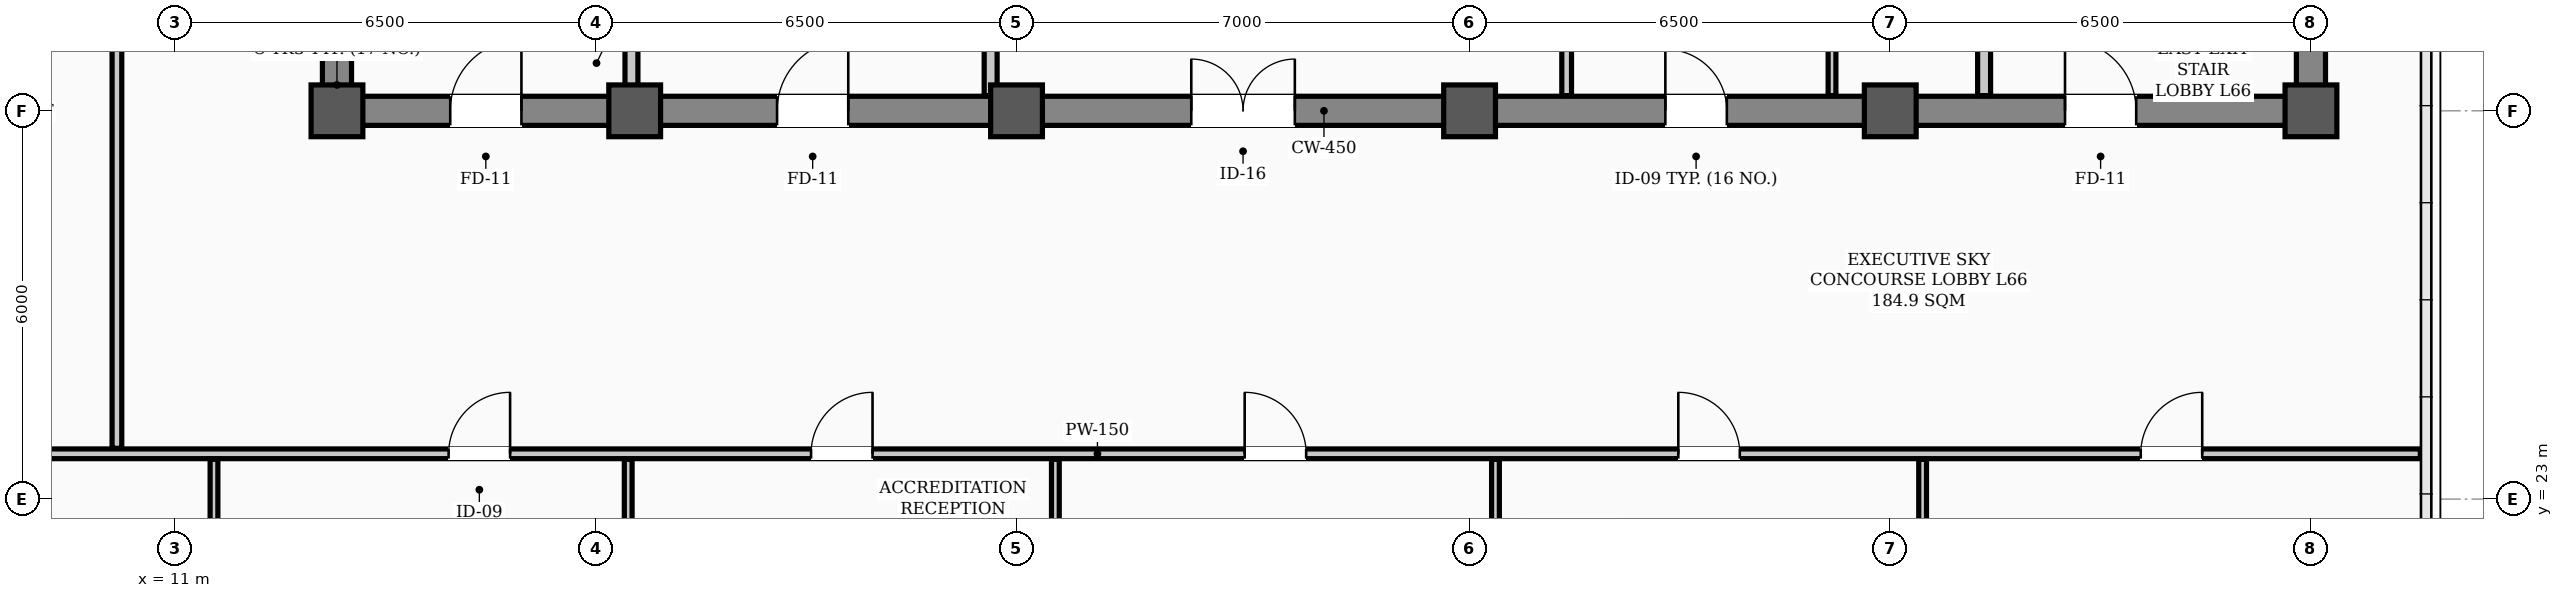
"""IFC4 building model, lengths in metres.
Left out: names, types, materials, properties, quantities, classifications, styles, units other than length and angle.
Written with IfcOpenShell. Run it as: python <this file> out.ifc"""

import sys

from ifc_helpers import new_model, si_unit, direction, frame, frame_2d, origin, origin_2d, place, context, subcontext, project, spatial, rectangle, hollow_rectangle, extrude, element, fill, save


model = new_model("IFC4")
c1 = context("Model", 3, precision=1e-05, world=origin(), true_north=direction((0.0, 1.0)))
c2 = subcontext(c1, "Body", "Model", "MODEL_VIEW")
j1 = project(units=[si_unit("LENGTHUNIT", "METRE"), si_unit("PLANEANGLEUNIT", "RADIAN")], contexts=[c1])
p1 = place(None, origin())
s1 = spatial("IfcSite", under=j1, at=p1, CompositionType="ELEMENT")
p2 = place(p1, origin())
s2 = spatial("IfcBuilding", under=s1, at=p2, CompositionType="ELEMENT")
p3 = place(p2, frame((0.0, 0.0, 265.7)))
s3 = spatial("IfcBuildingStorey", under=s2, at=p3, CompositionType="ELEMENT", Elevation=265.7)
for number, where, z_axis, x_axis in (
    (1, (13.5, 29.0, 0.0), (0.0, 0.0, 1.0), (1.0, 0.0, 0.0)),
    (2, (18.1, 29.0, 0.0), (0.0, 0.0, 1.0), (1.0, 0.0, 0.0)),
    (3, (24.0, 29.0, 0.0), (0.0, 0.0, 1.0), (1.0, 0.0, 0.0)),
    (4, (31.0, 29.0, 0.0), (0.0, 0.0, 1.0), (1.0, 0.0, 0.0)),
    (5, (37.5, 29.0, 0.0), (0.0, 0.0, 1.0), (1.0, 0.0, 0.0)),
    (6, (44.0, 29.0, 0.0), (0.0, 0.0, 1.0), (1.0, 0.0, 0.0)),
):
    element("IfcColumn", number, at=place(p3, frame(where, z_axis=z_axis, x_axis=x_axis)), inside=s3, PredefinedType="COLUMN", context=c2, shape_type="SweptSolid", body=[
        extrude(hollow_rectangle(XDim=0.8, YDim=0.8, WallThickness=0.032, InnerFilletRadius=0.016, OuterFilletRadius=0.048, at=origin_2d()), origin(), (0.0, 0.0, 1.0), 3.9),
    ])
p4 = place(p3, frame((13.5, 29.0, 0.0), z_axis=(0.0, 0.0, 1.0), x_axis=(1.0, 0.0, 0.0)))
e7 = element("IfcWall", 7, at=p4, inside=s3, PredefinedType="SHEAR", context=c2, shape_type="SweptSolid", body=[
    extrude(rectangle(XDim=30.5, YDim=0.45, at=frame_2d((15.25, 0.0))), origin(), (0.0, 0.0, 1.0), 3.72),
])
p5 = place(p4, frame((1.75, 0.0, 0.0)))
e8 = element("IfcOpeningElement", 8, at=p5, cuts=e7, PredefinedType="OPENING", context=c2, shape_type="SweptSolid", body=[
    extrude(rectangle(XDim=1.1, YDim=2.08, at=frame_2d((0.55, 1.04))), frame((0.0, 0.235, 0.0), z_axis=(0.0, -1.0, 0.0), x_axis=(1.0, 0.0, 0.0)), (0.0, 0.0, 1.0), 0.47),
])
p6 = place(p4, frame((26.7, 0.0, 0.0)))
e9 = element("IfcOpeningElement", 9, at=p6, cuts=e7, PredefinedType="OPENING", context=c2, shape_type="SweptSolid", body=[
    extrude(rectangle(XDim=1.1, YDim=2.08, at=frame_2d((0.55, 1.04))), frame((0.0, 0.235, 0.0), z_axis=(0.0, -1.0, 0.0), x_axis=(1.0, 0.0, 0.0)), (0.0, 0.0, 1.0), 0.47),
])
p7 = place(p4, frame((6.8, 0.0, 0.0)))
e10 = element("IfcOpeningElement", 10, at=p7, cuts=e7, PredefinedType="OPENING", context=c2, shape_type="SweptSolid", body=[
    extrude(rectangle(XDim=1.1, YDim=2.08, at=frame_2d((0.55, 1.04))), frame((0.0, 0.235, 0.0), z_axis=(0.0, -1.0, 0.0), x_axis=(1.0, 0.0, 0.0)), (0.0, 0.0, 1.0), 0.47),
])
p8 = place(p4, frame((13.2, 0.0, 0.0)))
e11 = element("IfcOpeningElement", 11, at=p8, cuts=e7, PredefinedType="OPENING", context=c2, shape_type="SweptSolid", body=[
    extrude(rectangle(XDim=1.6, YDim=2.08, at=frame_2d((0.8, 1.04))), frame((0.0, 0.235, 0.0), z_axis=(0.0, -1.0, 0.0), x_axis=(1.0, 0.0, 0.0)), (0.0, 0.0, 1.0), 0.47),
])
p9 = place(p4, frame((20.525, 0.0, 0.0)))
e12 = element("IfcOpeningElement", 12, at=p9, cuts=e7, PredefinedType="OPENING", context=c2, shape_type="SweptSolid", body=[
    extrude(rectangle(XDim=0.95, YDim=2.08, at=frame_2d((0.475, 1.04))), frame((0.0, 0.235, 0.0), z_axis=(0.0, -1.0, 0.0), x_axis=(1.0, 0.0, 0.0)), (0.0, 0.0, 1.0), 0.47),
])
for number, where, z_axis, x_axis in (
    (13, (13.5, 29.35, 0.0), (0.0, 0.0, 1.0), (0.0, 1.0, 0.0)),
    (14, (44.0, 29.35, 0.0), (0.0, 0.0, 1.0), (0.0, 1.0, 0.0)),
):
    element("IfcWall", number, at=place(p3, frame(where, z_axis=z_axis, x_axis=x_axis)), inside=s3, PredefinedType="SHEAR", context=c2, shape_type="SweptSolid", body=[
        extrude(rectangle(XDim=8.6, YDim=0.45, at=frame_2d((4.3, 0.0))), origin(), (0.0, 0.0, 1.0), 3.72),
    ])
p10 = place(p3, frame((4.81, 23.7, 0.0), z_axis=(0.0, 0.0, 1.0), x_axis=(1.0, 0.0, 0.0)))
e15 = element("IfcWall", 15, at=p10, inside=s3, PredefinedType="PARTITIONING", context=c2, shape_type="SweptSolid", body=[
    extrude(rectangle(XDim=40.88, YDim=0.15, at=frame_2d((20.44, 0.0))), origin(), (0.0, 0.0, 1.0), 3.2),
])
p11 = place(p10, frame((10.415, 0.0, 0.0)))
e16 = element("IfcOpeningElement", 16, at=p11, cuts=e15, PredefinedType="OPENING", context=c2, shape_type="SweptSolid", body=[
    extrude(rectangle(XDim=0.95, YDim=2.08, at=frame_2d((0.475, 1.04))), frame((0.0, 0.085, 0.0), z_axis=(0.0, -1.0, 0.0), x_axis=(1.0, 0.0, 0.0)), (0.0, 0.0, 1.0), 0.17),
])
p12 = place(p10, frame((16.015, 0.0, 0.0)))
e17 = element("IfcOpeningElement", 17, at=p12, cuts=e15, PredefinedType="OPENING", context=c2, shape_type="SweptSolid", body=[
    extrude(rectangle(XDim=0.95, YDim=2.08, at=frame_2d((0.475, 1.04))), frame((0.0, 0.085, 0.0), z_axis=(0.0, -1.0, 0.0), x_axis=(1.0, 0.0, 0.0)), (0.0, 0.0, 1.0), 0.17),
])
p13 = place(p10, frame((22.715, 0.0, 0.0)))
e18 = element("IfcOpeningElement", 18, at=p13, cuts=e15, PredefinedType="OPENING", context=c2, shape_type="SweptSolid", body=[
    extrude(rectangle(XDim=0.95, YDim=2.08, at=frame_2d((0.475, 1.04))), frame((0.0, 0.085, 0.0), z_axis=(0.0, -1.0, 0.0), x_axis=(1.0, 0.0, 0.0)), (0.0, 0.0, 1.0), 0.17),
])
p14 = place(p10, frame((29.415, 0.0, 0.0)))
e19 = element("IfcOpeningElement", 19, at=p14, cuts=e15, PredefinedType="OPENING", context=c2, shape_type="SweptSolid", body=[
    extrude(rectangle(XDim=0.95, YDim=2.08, at=frame_2d((0.475, 1.04))), frame((0.0, 0.085, 0.0), z_axis=(0.0, -1.0, 0.0), x_axis=(1.0, 0.0, 0.0)), (0.0, 0.0, 1.0), 0.17),
])
p15 = place(p10, frame((36.56, 0.0, 0.0)))
e20 = element("IfcOpeningElement", 20, at=p15, cuts=e15, PredefinedType="OPENING", context=c2, shape_type="SweptSolid", body=[
    extrude(rectangle(XDim=0.95, YDim=2.08, at=frame_2d((0.475, 1.04))), frame((0.0, 0.085, 0.0), z_axis=(0.0, -1.0, 0.0), x_axis=(1.0, 0.0, 0.0)), (0.0, 0.0, 1.0), 0.17),
])
p16 = place(p3, frame((18.05, 29.235, 0.0), z_axis=(0.0, 0.0, 1.0), x_axis=(0.0, 1.0, 0.0)))
e21 = element("IfcWall", 21, at=p16, inside=s3, PredefinedType="STANDARD", context=c2, shape_type="SweptSolid", body=[
    extrude(rectangle(XDim=1.065, YDim=0.2, at=frame_2d((0.532, 0.0))), origin(), (0.0, 0.0, 1.0), 3.4),
])
p17 = place(p3, frame((38.95, 29.235, 0.0), z_axis=(0.0, 0.0, 1.0), x_axis=(0.0, 1.0, 0.0)))
e22 = element("IfcWall", 22, at=p17, inside=s3, PredefinedType="STANDARD", context=c2, shape_type="SweptSolid", body=[
    extrude(rectangle(XDim=1.065, YDim=0.2, at=frame_2d((0.532, 0.0))), origin(), (0.0, 0.0, 1.0), 3.72),
])
p18 = place(p3, frame((23.6, 29.235, 0.0), z_axis=(0.0, 0.0, 1.0), x_axis=(0.0, 1.0, 0.0)))
e23 = element("IfcWall", 23, at=p18, inside=s3, PredefinedType="STANDARD", context=c2, shape_type="SweptSolid", body=[
    extrude(rectangle(XDim=5.465, YDim=0.2, at=frame_2d((2.732, 0.0))), origin(), (0.0, 0.0, 1.0), 3.2),
])
p19 = place(p3, frame((32.5, 29.235, 0.0), z_axis=(0.0, 0.0, 1.0), x_axis=(0.0, 1.0, 0.0)))
e24 = element("IfcWall", 24, at=p19, inside=s3, PredefinedType="PARTITIONING", context=c2, shape_type="SweptSolid", body=[
    extrude(rectangle(XDim=2.53, YDim=0.15, at=frame_2d((1.265, 0.0))), origin(), (0.0, 0.0, 1.0), 3.4),
])
p20 = place(p3, frame((36.6, 29.235, 0.0), z_axis=(0.0, 0.0, 1.0), x_axis=(0.0, 1.0, 0.0)))
e25 = element("IfcWall", 25, at=p20, inside=s3, PredefinedType="PARTITIONING", context=c2, shape_type="SweptSolid", body=[
    extrude(rectangle(XDim=2.53, YDim=0.12, at=frame_2d((1.265, 0.0))), origin(), (0.0, 0.0, 1.0), 3.4),
])
p21 = place(p3, frame((10.1, 23.785, 0.0), z_axis=(0.0, 0.0, 1.0), x_axis=(0.0, 1.0, 0.0)))
e26 = element("IfcWall", 26, at=p21, inside=s3, PredefinedType="PARTITIONING", context=c2, shape_type="SweptSolid", body=[
    extrude(rectangle(XDim=17.88, YDim=0.15, at=frame_2d((8.94, 0.0))), origin(), (0.0, 0.0, 1.0), 3.1),
])
p22 = place(p21, frame((8.465, 0.0, 0.0)))
e27 = element("IfcOpeningElement", 27, at=p22, cuts=e26, PredefinedType="OPENING", context=c2, shape_type="SweptSolid", body=[
    extrude(rectangle(XDim=0.95, YDim=2.08, at=frame_2d((0.475, 1.04))), frame((0.0, 0.085, 0.0), z_axis=(0.0, -1.0, 0.0), x_axis=(1.0, 0.0, 0.0)), (0.0, 0.0, 1.0), 0.17),
])
p23 = place(p3, frame((11.6, 17.91, 0.0), z_axis=(0.0, 0.0, 1.0), x_axis=(0.0, 1.0, 0.0)))
e28 = element("IfcWall", 28, at=p23, inside=s3, PredefinedType="PARTITIONING", context=c2, shape_type="SweptSolid", body=[
    extrude(rectangle(XDim=5.705, YDim=0.12, at=frame_2d((2.853, 0.0))), origin(), (0.0, 0.0, 1.0), 3.72),
])
p24 = place(p23, frame((3.815, 0.0, 0.0)))
e29 = element("IfcOpeningElement", 29, at=p24, cuts=e28, PredefinedType="OPENING", context=c2, shape_type="SweptSolid", body=[
    extrude(rectangle(XDim=0.95, YDim=2.08, at=frame_2d((0.475, 1.04))), frame((0.0, 0.07, 0.0), z_axis=(0.0, -1.0, 0.0), x_axis=(1.0, 0.0, 0.0)), (0.0, 0.0, 1.0), 0.14),
])
p25 = place(p3, frame((18.0, 17.91, 0.0), z_axis=(0.0, 0.0, 1.0), x_axis=(0.0, 1.0, 0.0)))
e30 = element("IfcWall", 30, at=p25, inside=s3, PredefinedType="PARTITIONING", context=c2, shape_type="SweptSolid", body=[
    extrude(rectangle(XDim=5.705, YDim=0.12, at=frame_2d((2.853, 0.0))), origin(), (0.0, 0.0, 1.0), 3.1),
])
p26 = place(p3, frame((24.6, 19.67, 0.0), z_axis=(0.0, 0.0, 1.0), x_axis=(0.0, 1.0, 0.0)))
e31 = element("IfcWall", 31, at=p26, inside=s3, PredefinedType="PARTITIONING", context=c2, shape_type="SweptSolid", body=[
    extrude(rectangle(XDim=3.945, YDim=0.12, at=frame_2d((1.973, 0.0))), origin(), (0.0, 0.0, 1.0), 3.1),
])
for number, where, z_axis, x_axis in (
    (32, (31.4, 17.91, 0.0), (0.0, 0.0, 1.0), (0.0, 1.0, 0.0)),
    (33, (38.0, 17.91, 0.0), (0.0, 0.0, 1.0), (0.0, 1.0, 0.0)),
):
    element("IfcWall", number, at=place(p3, frame(where, z_axis=z_axis, x_axis=x_axis)), inside=s3, PredefinedType="PARTITIONING", context=c2, shape_type="SweptSolid", body=[
        extrude(rectangle(XDim=5.705, YDim=0.12, at=frame_2d((2.853, 0.0))), origin(), (0.0, 0.0, 1.0), 3.1),
    ])
p27 = place(p5, origin())
e34 = element("IfcDoor", 34, at=p27, inside=s3, OperationType="SINGLE_SWING_RIGHT", PredefinedType="DOOR", context=c2, shape_type="SweptSolid", body=[
    extrude(rectangle(XDim=1.1, YDim=2.08, at=frame_2d((0.55, 1.04))), frame((0.0, 0.025, 0.0), z_axis=(0.0, -1.0, 0.0), x_axis=(1.0, 0.0, 0.0)), (0.0, 0.0, 1.0), 0.05),
])
fill(e8, e34)
p28 = place(p6, origin())
e35 = element("IfcDoor", 35, at=p28, inside=s3, OperationType="SINGLE_SWING_LEFT", PredefinedType="DOOR", context=c2, shape_type="SweptSolid", body=[
    extrude(rectangle(XDim=1.1, YDim=2.08, at=frame_2d((0.55, 1.04))), frame((0.0, 0.025, 0.0), z_axis=(0.0, -1.0, 0.0), x_axis=(1.0, 0.0, 0.0)), (0.0, 0.0, 1.0), 0.05),
])
fill(e9, e35)
p29 = place(p7, origin())
e36 = element("IfcDoor", 36, at=p29, inside=s3, OperationType="SINGLE_SWING_RIGHT", PredefinedType="DOOR", context=c2, shape_type="SweptSolid", body=[
    extrude(rectangle(XDim=1.1, YDim=2.08, at=frame_2d((0.55, 1.04))), frame((0.0, 0.025, 0.0), z_axis=(0.0, -1.0, 0.0), x_axis=(1.0, 0.0, 0.0)), (0.0, 0.0, 1.0), 0.05),
])
fill(e10, e36)
p30 = place(p8, origin())
e37 = element("IfcDoor", 37, at=p30, inside=s3, OperationType="DOUBLE_DOOR_SINGLE_SWING", PredefinedType="DOOR", context=c2, shape_type="SweptSolid", body=[
    extrude(rectangle(XDim=1.6, YDim=2.08, at=frame_2d((0.8, 1.04))), frame((0.0, 0.025, 0.0), z_axis=(0.0, -1.0, 0.0), x_axis=(1.0, 0.0, 0.0)), (0.0, 0.0, 1.0), 0.05),
])
fill(e11, e37)
p31 = place(p9, origin())
e38 = element("IfcDoor", 38, at=p31, inside=s3, OperationType="SINGLE_SWING_LEFT", PredefinedType="DOOR", context=c2, shape_type="SweptSolid", body=[
    extrude(rectangle(XDim=0.95, YDim=2.08, at=frame_2d((0.475, 1.04))), frame((0.0, 0.025, 0.0), z_axis=(0.0, -1.0, 0.0), x_axis=(1.0, 0.0, 0.0)), (0.0, 0.0, 1.0), 0.05),
])
fill(e12, e38)
p32 = place(p11, origin())
e39 = element("IfcDoor", 39, at=p32, inside=s3, OperationType="SINGLE_SWING_RIGHT", PredefinedType="DOOR", context=c2, shape_type="SweptSolid", body=[
    extrude(rectangle(XDim=0.95, YDim=2.08, at=frame_2d((0.475, 1.04))), frame((0.0, 0.025, 0.0), z_axis=(0.0, -1.0, 0.0), x_axis=(1.0, 0.0, 0.0)), (0.0, 0.0, 1.0), 0.05),
])
fill(e16, e39)
p33 = place(p12, origin())
e40 = element("IfcDoor", 40, at=p33, inside=s3, OperationType="SINGLE_SWING_RIGHT", PredefinedType="DOOR", context=c2, shape_type="SweptSolid", body=[
    extrude(rectangle(XDim=0.95, YDim=2.08, at=frame_2d((0.475, 1.04))), frame((0.0, 0.025, 0.0), z_axis=(0.0, -1.0, 0.0), x_axis=(1.0, 0.0, 0.0)), (0.0, 0.0, 1.0), 0.05),
])
fill(e17, e40)
p34 = place(p13, origin())
e41 = element("IfcDoor", 41, at=p34, inside=s3, OperationType="SINGLE_SWING_LEFT", PredefinedType="DOOR", context=c2, shape_type="SweptSolid", body=[
    extrude(rectangle(XDim=0.95, YDim=2.08, at=frame_2d((0.475, 1.04))), frame((0.0, 0.025, 0.0), z_axis=(0.0, -1.0, 0.0), x_axis=(1.0, 0.0, 0.0)), (0.0, 0.0, 1.0), 0.05),
])
fill(e18, e41)
p35 = place(p14, origin())
e42 = element("IfcDoor", 42, at=p35, inside=s3, OperationType="SINGLE_SWING_LEFT", PredefinedType="DOOR", context=c2, shape_type="SweptSolid", body=[
    extrude(rectangle(XDim=0.95, YDim=2.08, at=frame_2d((0.475, 1.04))), frame((0.0, 0.025, 0.0), z_axis=(0.0, -1.0, 0.0), x_axis=(1.0, 0.0, 0.0)), (0.0, 0.0, 1.0), 0.05),
])
fill(e19, e42)
p36 = place(p15, origin())
e43 = element("IfcDoor", 43, at=p36, inside=s3, OperationType="SINGLE_SWING_RIGHT", PredefinedType="DOOR", context=c2, shape_type="SweptSolid", body=[
    extrude(rectangle(XDim=0.95, YDim=2.08, at=frame_2d((0.475, 1.04))), frame((0.0, 0.025, 0.0), z_axis=(0.0, -1.0, 0.0), x_axis=(1.0, 0.0, 0.0)), (0.0, 0.0, 1.0), 0.05),
])
fill(e20, e43)
save(model, sys.argv[1])
